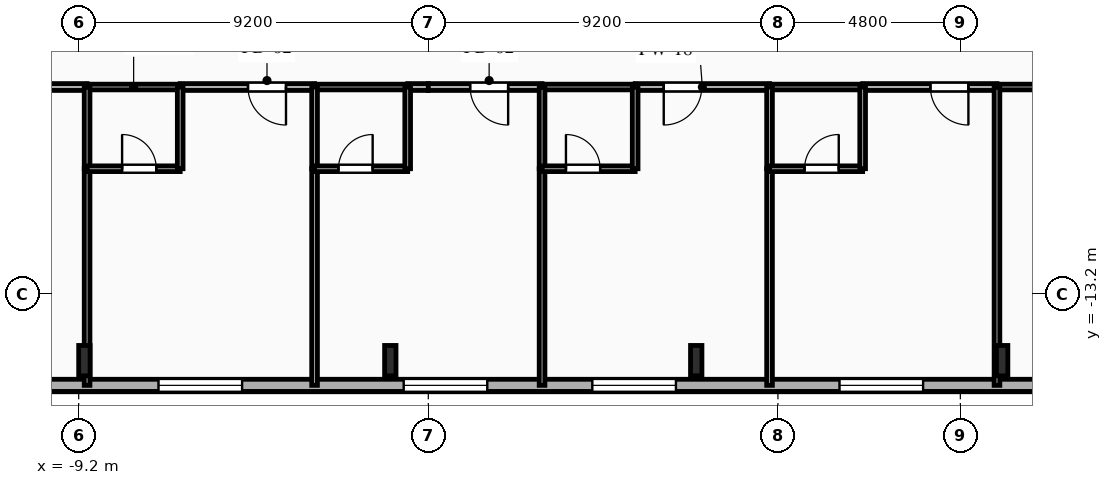
"""IFC4 building model, lengths in metres.
Left out: names, types, materials, properties, quantities, classifications, styles, units other than length and angle.
Written with IfcOpenShell. Run it as: python <this file> out.ifc"""

import sys

from ifc_helpers import new_model, si_unit, direction, frame, frame_2d, origin, origin_2d, place, context, subcontext, project, spatial, rectangle, i_section, extrude, element, fill, save


model = new_model("IFC4")
c1 = context("Model", 3, precision=1e-05, world=origin(), true_north=direction((0.0, 1.0)))
c2 = subcontext(c1, "Body", "Model", "MODEL_VIEW")
j1 = project(units=[si_unit("LENGTHUNIT", "METRE"), si_unit("PLANEANGLEUNIT", "RADIAN")], contexts=[c1])
p1 = place(None, origin())
s1 = spatial("IfcSite", under=j1, at=p1, CompositionType="ELEMENT")
p2 = place(p1, origin())
s2 = spatial("IfcBuilding", under=s1, at=p2, CompositionType="ELEMENT")
p3 = place(p2, frame((0.0, 0.0, 147.75)))
s3 = spatial("IfcBuildingStorey", under=s2, at=p3, CompositionType="ELEMENT", Elevation=147.75)
for number, where, z_axis, x_axis in (
    (1, (-9.05, -14.95, 0.0), (0.0, 0.0, 1.0), (1.0, 0.0, 0.0)),
    (2, (-1.0, -14.95, 0.0), (0.0, 0.0, 1.0), (1.0, 0.0, 0.0)),
    (3, (7.05, -14.95, 0.0), (0.0, 0.0, 1.0), (1.0, 0.0, 0.0)),
    (4, (15.1, -14.95, 0.0), (0.0, 0.0, 1.0), (1.0, 0.0, 0.0)),
):
    element("IfcColumn", number, at=place(p3, frame(where, z_axis=z_axis, x_axis=x_axis)), inside=s3, PredefinedType="COLUMN", context=c2, shape_type="SweptSolid", body=[
        extrude(i_section(OverallWidth=0.3, OverallDepth=0.8, WebThickness=0.018, FlangeThickness=0.033, FilletRadius=0.03, at=origin_2d()), origin(), (0.0, 0.0, 1.0), 3.35),
    ])
p4 = place(p3, frame((23.8, -15.6, 0.0), z_axis=(0.0, 0.0, 1.0), x_axis=(-1.0, 0.0, 0.0)))
e5 = element("IfcWall", 5, at=p4, inside=s3, PredefinedType="SOLIDWALL", context=c2, shape_type="SweptSolid", body=[
    extrude(rectangle(XDim=49.6, YDim=0.32, at=frame_2d((24.8, 0.0))), origin(), (0.0, 0.0, 1.0), 3.04),
])
p5 = place(p4, frame((1.13, 0.0, 0.85)))
e6 = element("IfcOpeningElement", 6, at=p5, cuts=e5, PredefinedType="OPENING", context=c2, shape_type="SweptSolid", body=[
    extrude(rectangle(XDim=1.1, YDim=1.85, at=frame_2d((0.55, 0.925))), frame((0.0, 0.17, 0.0), z_axis=(0.0, -1.0, 0.0), x_axis=(1.0, 0.0, 0.0)), (0.0, 0.0, 1.0), 0.34),
])
p6 = place(p4, frame((5.055, 0.0, 0.85)))
e7 = element("IfcOpeningElement", 7, at=p6, cuts=e5, PredefinedType="OPENING", context=c2, shape_type="SweptSolid", body=[
    extrude(rectangle(XDim=1.65, YDim=1.85, at=frame_2d((0.825, 0.925))), frame((0.0, 0.17, 0.0), z_axis=(0.0, -1.0, 0.0), x_axis=(1.0, 0.0, 0.0)), (0.0, 0.0, 1.0), 0.34),
])
p7 = place(p4, frame((10.78, 0.0, 0.85)))
e8 = element("IfcOpeningElement", 8, at=p7, cuts=e5, PredefinedType="OPENING", context=c2, shape_type="SweptSolid", body=[
    extrude(rectangle(XDim=2.2, YDim=1.85, at=frame_2d((1.1, 0.925))), frame((0.0, 0.17, 0.0), z_axis=(0.0, -1.0, 0.0), x_axis=(1.0, 0.0, 0.0)), (0.0, 0.0, 1.0), 0.34),
])
p8 = place(p4, frame((17.284, 0.0, 0.85)))
e9 = element("IfcOpeningElement", 9, at=p8, cuts=e5, PredefinedType="OPENING", context=c2, shape_type="SweptSolid", body=[
    extrude(rectangle(XDim=2.2, YDim=1.85, at=frame_2d((1.1, 0.925))), frame((0.0, 0.17, 0.0), z_axis=(0.0, -1.0, 0.0), x_axis=(1.0, 0.0, 0.0)), (0.0, 0.0, 1.0), 0.34),
])
p9 = place(p4, frame((22.248, 0.0, 0.85)))
e10 = element("IfcOpeningElement", 10, at=p9, cuts=e5, PredefinedType="OPENING", context=c2, shape_type="SweptSolid", body=[
    extrude(rectangle(XDim=2.2, YDim=1.85, at=frame_2d((1.1, 0.925))), frame((0.0, 0.17, 0.0), z_axis=(0.0, -1.0, 0.0), x_axis=(1.0, 0.0, 0.0)), (0.0, 0.0, 1.0), 0.34),
])
p10 = place(p4, frame((28.7, 0.0, 0.85)))
e11 = element("IfcOpeningElement", 11, at=p10, cuts=e5, PredefinedType="OPENING", context=c2, shape_type="SweptSolid", body=[
    extrude(rectangle(XDim=2.2, YDim=1.85, at=frame_2d((1.1, 0.925))), frame((0.0, 0.17, 0.0), z_axis=(0.0, -1.0, 0.0), x_axis=(1.0, 0.0, 0.0)), (0.0, 0.0, 1.0), 0.34),
])
p11 = place(p4, frame((34.7, 0.0, 0.85)))
e12 = element("IfcOpeningElement", 12, at=p11, cuts=e5, PredefinedType="OPENING", context=c2, shape_type="SweptSolid", body=[
    extrude(rectangle(XDim=2.2, YDim=1.85, at=frame_2d((1.1, 0.925))), frame((0.0, 0.17, 0.0), z_axis=(0.0, -1.0, 0.0), x_axis=(1.0, 0.0, 0.0)), (0.0, 0.0, 1.0), 0.34),
])
p12 = place(p4, frame((41.492, 0.0, 0.85)))
e13 = element("IfcOpeningElement", 13, at=p12, cuts=e5, PredefinedType="OPENING", context=c2, shape_type="SweptSolid", body=[
    extrude(rectangle(XDim=1.65, YDim=1.85, at=frame_2d((0.825, 0.925))), frame((0.0, 0.17, 0.0), z_axis=(0.0, -1.0, 0.0), x_axis=(1.0, 0.0, 0.0)), (0.0, 0.0, 1.0), 0.34),
])
p13 = place(p4, frame((46.175, 0.0, 0.85)))
e14 = element("IfcOpeningElement", 14, at=p13, cuts=e5, PredefinedType="OPENING", context=c2, shape_type="SweptSolid", body=[
    extrude(rectangle(XDim=1.65, YDim=1.85, at=frame_2d((0.825, 0.925))), frame((0.0, 0.17, 0.0), z_axis=(0.0, -1.0, 0.0), x_axis=(1.0, 0.0, 0.0)), (0.0, 0.0, 1.0), 0.34),
])
p14 = place(p3, frame((-8.979, -7.75, 0.0), z_axis=(0.0, 0.0, 1.0), x_axis=(-1.0, 0.0, 0.0)))
e15 = element("IfcWall", 15, at=p14, inside=s3, PredefinedType="PARTITIONING", context=c2, shape_type="SweptSolid", body=[
    extrude(rectangle(XDim=3.535, YDim=0.18, at=frame_2d((1.768, 0.0))), origin(), (0.0, 0.0, 1.0), 3.04),
])
p15 = place(p14, frame((1.783, 0.0, 0.0)))
e16 = element("IfcOpeningElement", 16, at=p15, cuts=e15, PredefinedType="OPENING", context=c2, shape_type="SweptSolid", body=[
    extrude(rectangle(XDim=1.0, YDim=2.15, at=frame_2d((0.5, 1.075))), frame((0.0, 0.1, 0.0), z_axis=(0.0, -1.0, 0.0), x_axis=(1.0, 0.0, 0.0)), (0.0, 0.0, 1.0), 0.2),
])
p16 = place(p3, frame((-2.993, -7.75, 0.0), z_axis=(0.0, 0.0, 1.0), x_axis=(-1.0, 0.0, 0.0)))
e17 = element("IfcWall", 17, at=p16, inside=s3, PredefinedType="PARTITIONING", context=c2, shape_type="SweptSolid", body=[
    extrude(rectangle(XDim=3.536, YDim=0.18, at=frame_2d((1.768, 0.0))), origin(), (0.0, 0.0, 1.0), 3.04),
])
p17 = place(p16, frame((0.752, 0.0, 0.0)))
e18 = element("IfcOpeningElement", 18, at=p17, cuts=e17, PredefinedType="OPENING", context=c2, shape_type="SweptSolid", body=[
    extrude(rectangle(XDim=1.0, YDim=2.15, at=frame_2d((0.5, 1.075))), frame((0.0, 0.1, 0.0), z_axis=(0.0, -1.0, 0.0), x_axis=(1.0, 0.0, 0.0)), (0.0, 0.0, 1.0), 0.2),
])
p18 = place(p3, frame((-6.529, -7.75, 0.0), z_axis=(0.0, 0.0, 1.0), x_axis=(-1.0, 0.0, 0.0)))
e19 = element("IfcWall", 19, at=p18, inside=s3, PredefinedType="PLUMBINGWALL", context=c2, shape_type="SweptSolid", body=[
    extrude(rectangle(XDim=2.45, YDim=0.15, at=frame_2d((1.225, 0.0))), origin(), (0.0, 0.0, 1.0), 3.04),
])
p19 = place(p3, frame((0.0, -7.75, 0.0), z_axis=(0.0, 0.0, 1.0), x_axis=(-1.0, 0.0, 0.0)))
e20 = element("IfcWall", 20, at=p19, inside=s3, PredefinedType="PARTITIONING", context=c2, shape_type="SweptSolid", body=[
    extrude(rectangle(XDim=0.543, YDim=0.18, at=frame_2d((0.271, 0.0))), origin(), (0.0, 0.0, 1.0), 3.04),
])
p20 = place(p3, frame((-0.543, -7.75, 0.0), z_axis=(0.0, 0.0, 1.0), x_axis=(-1.0, 0.0, 0.0)))
e21 = element("IfcWall", 21, at=p20, inside=s3, PredefinedType="PLUMBINGWALL", context=c2, shape_type="SweptSolid", body=[
    extrude(rectangle(XDim=2.45, YDim=0.15, at=frame_2d((1.225, 0.0))), origin(), (0.0, 0.0, 1.0), 3.04),
])
p21 = place(p3, frame((2.993, -7.75, 0.0), z_axis=(0.0, 0.0, 1.0), x_axis=(-1.0, 0.0, 0.0)))
e22 = element("IfcWall", 22, at=p21, inside=s3, PredefinedType="PARTITIONING", context=c2, shape_type="SweptSolid", body=[
    extrude(rectangle(XDim=2.993, YDim=0.18, at=frame_2d((1.497, 0.0))), origin(), (0.0, 0.0, 1.0), 3.04),
])
p22 = place(p21, frame((0.892, 0.0, 0.0)))
e23 = element("IfcOpeningElement", 23, at=p22, cuts=e22, PredefinedType="OPENING", context=c2, shape_type="SweptSolid", body=[
    extrude(rectangle(XDim=1.0, YDim=2.15, at=frame_2d((0.5, 1.075))), frame((0.0, 0.1, 0.0), z_axis=(0.0, -1.0, 0.0), x_axis=(1.0, 0.0, 0.0)), (0.0, 0.0, 1.0), 0.2),
])
p23 = place(p3, frame((8.979, -7.75, 0.0), z_axis=(0.0, 0.0, 1.0), x_axis=(-1.0, 0.0, 0.0)))
e24 = element("IfcWall", 24, at=p23, inside=s3, PredefinedType="PARTITIONING", context=c2, shape_type="SweptSolid", body=[
    extrude(rectangle(XDim=3.536, YDim=0.18, at=frame_2d((1.768, 0.0))), origin(), (0.0, 0.0, 1.0), 3.04),
])
p24 = place(p23, frame((1.784, 0.0, 0.0)))
e25 = element("IfcOpeningElement", 25, at=p24, cuts=e24, PredefinedType="OPENING", context=c2, shape_type="SweptSolid", body=[
    extrude(rectangle(XDim=1.0, YDim=2.15, at=frame_2d((0.5, 1.075))), frame((0.0, 0.1, 0.0), z_axis=(0.0, -1.0, 0.0), x_axis=(1.0, 0.0, 0.0)), (0.0, 0.0, 1.0), 0.2),
])
p25 = place(p3, frame((5.443, -7.75, 0.0), z_axis=(0.0, 0.0, 1.0), x_axis=(-1.0, 0.0, 0.0)))
e26 = element("IfcWall", 26, at=p25, inside=s3, PredefinedType="PLUMBINGWALL", context=c2, shape_type="SweptSolid", body=[
    extrude(rectangle(XDim=2.45, YDim=0.15, at=frame_2d((1.225, 0.0))), origin(), (0.0, 0.0, 1.0), 3.04),
])
p26 = place(p3, frame((14.964, -7.75, 0.0), z_axis=(0.0, 0.0, 1.0), x_axis=(-1.0, 0.0, 0.0)))
e27 = element("IfcWall", 27, at=p26, inside=s3, PredefinedType="PARTITIONING", context=c2, shape_type="SweptSolid", body=[
    extrude(rectangle(XDim=3.535, YDim=0.18, at=frame_2d((1.768, 0.0))), origin(), (0.0, 0.0, 1.0), 3.04),
])
p27 = place(p26, frame((0.752, 0.0, 0.0)))
e28 = element("IfcOpeningElement", 28, at=p27, cuts=e27, PredefinedType="OPENING", context=c2, shape_type="SweptSolid", body=[
    extrude(rectangle(XDim=1.0, YDim=2.15, at=frame_2d((0.5, 1.075))), frame((0.0, 0.1, 0.0), z_axis=(0.0, -1.0, 0.0), x_axis=(1.0, 0.0, 0.0)), (0.0, 0.0, 1.0), 0.2),
])
p28 = place(p3, frame((11.429, -7.75, 0.0), z_axis=(0.0, 0.0, 1.0), x_axis=(-1.0, 0.0, 0.0)))
e29 = element("IfcWall", 29, at=p28, inside=s3, PredefinedType="PLUMBINGWALL", context=c2, shape_type="SweptSolid", body=[
    extrude(rectangle(XDim=2.45, YDim=0.15, at=frame_2d((1.225, 0.0))), origin(), (0.0, 0.0, 1.0), 3.04),
])
p29 = place(p3, frame((20.95, -7.75, 0.0), z_axis=(0.0, 0.0, 1.0), x_axis=(-1.0, 0.0, 0.0)))
e30 = element("IfcWall", 30, at=p29, inside=s3, PredefinedType="PARTITIONING", context=c2, shape_type="SweptSolid", body=[
    extrude(rectangle(XDim=5.986, YDim=0.15, at=frame_2d((2.993, 0.0))), origin(), (0.0, 0.0, 1.0), 3.04),
])
p30 = place(p29, frame((3.884, 0.0, 0.0)))
e31 = element("IfcOpeningElement", 31, at=p30, cuts=e30, PredefinedType="OPENING", context=c2, shape_type="SweptSolid", body=[
    extrude(rectangle(XDim=1.05, YDim=2.15, at=frame_2d((0.525, 1.075))), frame((0.0, 0.085, 0.0), z_axis=(0.0, -1.0, 0.0), x_axis=(1.0, 0.0, 0.0)), (0.0, 0.0, 1.0), 0.17),
])
p31 = place(p3, frame((-8.979, -9.9, 0.0), z_axis=(0.0, 0.0, 1.0), x_axis=(0.0, -1.0, 0.0)))
e32 = element("IfcWall", 32, at=p31, inside=s3, PredefinedType="PARTITIONING", context=c2, shape_type="SweptSolid", body=[
    extrude(rectangle(XDim=5.7, YDim=0.15, at=frame_2d((2.85, 0.0))), origin(), (0.0, 0.0, 1.0), 2.525),
])
p32 = place(p3, frame((-8.979, -7.75, 0.0), z_axis=(0.0, 0.0, 1.0), x_axis=(0.0, -1.0, 0.0)))
e33 = element("IfcWall", 33, at=p32, inside=s3, PredefinedType="PLUMBINGWALL", context=c2, shape_type="SweptSolid", body=[
    extrude(rectangle(XDim=2.15, YDim=0.15, at=frame_2d((1.075, 0.0))), origin(), (0.0, 0.0, 1.0), 2.525),
])
p33 = place(p3, frame((-8.979, -9.9, 0.0), z_axis=(0.0, 0.0, 1.0), x_axis=(1.0, 0.0, 0.0)))
e34 = element("IfcWall", 34, at=p33, inside=s3, PredefinedType="PLUMBINGWALL", context=c2, shape_type="SweptSolid", body=[
    extrude(rectangle(XDim=2.45, YDim=0.15, at=frame_2d((1.225, 0.0))), origin(), (0.0, 0.0, 1.0), 3.04),
])
p34 = place(p33, frame((0.921, 0.0, 0.0)))
e35 = element("IfcOpeningElement", 35, at=p34, cuts=e34, PredefinedType="OPENING", context=c2, shape_type="SweptSolid", body=[
    extrude(rectangle(XDim=0.9, YDim=2.1, at=frame_2d((0.45, 1.05))), frame((0.0, 0.085, 0.0), z_axis=(0.0, -1.0, 0.0), x_axis=(1.0, 0.0, 0.0)), (0.0, 0.0, 1.0), 0.17),
])
p35 = place(p3, frame((-6.529, -9.9, 0.0), z_axis=(0.0, 0.0, 1.0), x_axis=(0.0, 1.0, 0.0)))
e36 = element("IfcWall", 36, at=p35, inside=s3, PredefinedType="PLUMBINGWALL", context=c2, shape_type="SweptSolid", body=[
    extrude(rectangle(XDim=2.15, YDim=0.15, at=frame_2d((1.075, 0.0))), origin(), (0.0, 0.0, 1.0), 3.04),
])
p36 = place(p3, frame((-2.993, -9.9, 0.0), z_axis=(0.0, 0.0, 1.0), x_axis=(0.0, -1.0, 0.0)))
e37 = element("IfcWall", 37, at=p36, inside=s3, PredefinedType="PARTITIONING", context=c2, shape_type="SweptSolid", body=[
    extrude(rectangle(XDim=5.7, YDim=0.15, at=frame_2d((2.85, 0.0))), origin(), (0.0, 0.0, 1.0), 3.04),
])
p37 = place(p3, frame((-2.993, -7.75, 0.0), z_axis=(0.0, 0.0, 1.0), x_axis=(0.0, -1.0, 0.0)))
e38 = element("IfcWall", 38, at=p37, inside=s3, PredefinedType="PLUMBINGWALL", context=c2, shape_type="SweptSolid", body=[
    extrude(rectangle(XDim=2.15, YDim=0.15, at=frame_2d((1.075, 0.0))), origin(), (0.0, 0.0, 1.0), 3.04),
])
p38 = place(p3, frame((-2.993, -9.9, 0.0), z_axis=(0.0, 0.0, 1.0), x_axis=(1.0, 0.0, 0.0)))
e39 = element("IfcWall", 39, at=p38, inside=s3, PredefinedType="PLUMBINGWALL", context=c2, shape_type="SweptSolid", body=[
    extrude(rectangle(XDim=2.45, YDim=0.15, at=frame_2d((1.225, 0.0))), origin(), (0.0, 0.0, 1.0), 3.04),
])
p39 = place(p38, frame((0.629, 0.0, 0.0)))
e40 = element("IfcOpeningElement", 40, at=p39, cuts=e39, PredefinedType="OPENING", context=c2, shape_type="SweptSolid", body=[
    extrude(rectangle(XDim=0.9, YDim=2.1, at=frame_2d((0.45, 1.05))), frame((0.0, 0.085, 0.0), z_axis=(0.0, -1.0, 0.0), x_axis=(1.0, 0.0, 0.0)), (0.0, 0.0, 1.0), 0.17),
])
p40 = place(p3, frame((-0.543, -9.9, 0.0), z_axis=(0.0, 0.0, 1.0), x_axis=(0.0, 1.0, 0.0)))
e41 = element("IfcWall", 41, at=p40, inside=s3, PredefinedType="PLUMBINGWALL", context=c2, shape_type="SweptSolid", body=[
    extrude(rectangle(XDim=2.15, YDim=0.15, at=frame_2d((1.075, 0.0))), origin(), (0.0, 0.0, 1.0), 3.04),
])
p41 = place(p3, frame((2.993, -9.9, 0.0), z_axis=(0.0, 0.0, 1.0), x_axis=(0.0, -1.0, 0.0)))
e42 = element("IfcWall", 42, at=p41, inside=s3, PredefinedType="PARTITIONING", context=c2, shape_type="SweptSolid", body=[
    extrude(rectangle(XDim=5.7, YDim=0.15, at=frame_2d((2.85, 0.0))), origin(), (0.0, 0.0, 1.0), 3.04),
])
p42 = place(p3, frame((2.993, -7.75, 0.0), z_axis=(0.0, 0.0, 1.0), x_axis=(0.0, -1.0, 0.0)))
e43 = element("IfcWall", 43, at=p42, inside=s3, PredefinedType="PLUMBINGWALL", context=c2, shape_type="SweptSolid", body=[
    extrude(rectangle(XDim=2.15, YDim=0.15, at=frame_2d((1.075, 0.0))), origin(), (0.0, 0.0, 1.0), 3.04),
])
p43 = place(p3, frame((2.993, -9.9, 0.0), z_axis=(0.0, 0.0, 1.0), x_axis=(1.0, 0.0, 0.0)))
e44 = element("IfcWall", 44, at=p43, inside=s3, PredefinedType="PLUMBINGWALL", context=c2, shape_type="SweptSolid", body=[
    extrude(rectangle(XDim=2.45, YDim=0.15, at=frame_2d((1.225, 0.0))), origin(), (0.0, 0.0, 1.0), 3.04),
])
p44 = place(p43, frame((0.629, 0.0, 0.0)))
e45 = element("IfcOpeningElement", 45, at=p44, cuts=e44, PredefinedType="OPENING", context=c2, shape_type="SweptSolid", body=[
    extrude(rectangle(XDim=0.9, YDim=2.1, at=frame_2d((0.45, 1.05))), frame((0.0, 0.085, 0.0), z_axis=(0.0, -1.0, 0.0), x_axis=(1.0, 0.0, 0.0)), (0.0, 0.0, 1.0), 0.17),
])
p45 = place(p3, frame((5.443, -9.9, 0.0), z_axis=(0.0, 0.0, 1.0), x_axis=(0.0, 1.0, 0.0)))
e46 = element("IfcWall", 46, at=p45, inside=s3, PredefinedType="PLUMBINGWALL", context=c2, shape_type="SweptSolid", body=[
    extrude(rectangle(XDim=2.15, YDim=0.15, at=frame_2d((1.075, 0.0))), origin(), (0.0, 0.0, 1.0), 3.04),
])
p46 = place(p3, frame((8.979, -9.9, 0.0), z_axis=(0.0, 0.0, 1.0), x_axis=(0.0, -1.0, 0.0)))
e47 = element("IfcWall", 47, at=p46, inside=s3, PredefinedType="PARTITIONING", context=c2, shape_type="SweptSolid", body=[
    extrude(rectangle(XDim=5.7, YDim=0.15, at=frame_2d((2.85, 0.0))), origin(), (0.0, 0.0, 1.0), 3.04),
])
p47 = place(p3, frame((8.979, -7.75, 0.0), z_axis=(0.0, 0.0, 1.0), x_axis=(0.0, -1.0, 0.0)))
e48 = element("IfcWall", 48, at=p47, inside=s3, PredefinedType="PLUMBINGWALL", context=c2, shape_type="SweptSolid", body=[
    extrude(rectangle(XDim=2.15, YDim=0.15, at=frame_2d((1.075, 0.0))), origin(), (0.0, 0.0, 1.0), 3.04),
])
p48 = place(p3, frame((8.979, -9.9, 0.0), z_axis=(0.0, 0.0, 1.0), x_axis=(1.0, 0.0, 0.0)))
e49 = element("IfcWall", 49, at=p48, inside=s3, PredefinedType="PLUMBINGWALL", context=c2, shape_type="SweptSolid", body=[
    extrude(rectangle(XDim=2.45, YDim=0.15, at=frame_2d((1.225, 0.0))), origin(), (0.0, 0.0, 1.0), 3.04),
])
p49 = place(p48, frame((0.921, 0.0, 0.0)))
e50 = element("IfcOpeningElement", 50, at=p49, cuts=e49, PredefinedType="OPENING", context=c2, shape_type="SweptSolid", body=[
    extrude(rectangle(XDim=0.9, YDim=2.1, at=frame_2d((0.45, 1.05))), frame((0.0, 0.085, 0.0), z_axis=(0.0, -1.0, 0.0), x_axis=(1.0, 0.0, 0.0)), (0.0, 0.0, 1.0), 0.17),
])
p50 = place(p3, frame((11.429, -9.9, 0.0), z_axis=(0.0, 0.0, 1.0), x_axis=(0.0, 1.0, 0.0)))
e51 = element("IfcWall", 51, at=p50, inside=s3, PredefinedType="PLUMBINGWALL", context=c2, shape_type="SweptSolid", body=[
    extrude(rectangle(XDim=2.15, YDim=0.15, at=frame_2d((1.075, 0.0))), origin(), (0.0, 0.0, 1.0), 3.04),
])
p51 = place(p3, frame((14.964, -7.75, 0.0), z_axis=(0.0, 0.0, 1.0), x_axis=(0.0, -1.0, 0.0)))
e52 = element("IfcWall", 52, at=p51, inside=s3, PredefinedType="PARTITIONING", context=c2, shape_type="SweptSolid", body=[
    extrude(rectangle(XDim=7.85, YDim=0.15, at=frame_2d((3.925, 0.0))), origin(), (0.0, 0.0, 1.0), 3.04),
])
p52 = place(p7, origin())
e53 = element("IfcWindow", 53, at=p52, inside=s3, PartitioningType="SINGLE_PANEL", PredefinedType="WINDOW", context=c2, shape_type="SweptSolid", body=[
    extrude(rectangle(XDim=2.2, YDim=1.85, at=frame_2d((1.1, 0.925))), frame((0.0, 0.03, 0.0), z_axis=(0.0, -1.0, 0.0), x_axis=(1.0, 0.0, 0.0)), (0.0, 0.0, 1.0), 0.06),
])
fill(e8, e53)
p53 = place(p8, origin())
e54 = element("IfcWindow", 54, at=p53, inside=s3, PartitioningType="SINGLE_PANEL", PredefinedType="WINDOW", context=c2, shape_type="SweptSolid", body=[
    extrude(rectangle(XDim=2.2, YDim=1.85, at=frame_2d((1.1, 0.925))), frame((0.0, 0.03, 0.0), z_axis=(0.0, -1.0, 0.0), x_axis=(1.0, 0.0, 0.0)), (0.0, 0.0, 1.0), 0.06),
])
fill(e9, e54)
p54 = place(p9, origin())
e55 = element("IfcWindow", 55, at=p54, inside=s3, PartitioningType="SINGLE_PANEL", PredefinedType="WINDOW", context=c2, shape_type="SweptSolid", body=[
    extrude(rectangle(XDim=2.2, YDim=1.85, at=frame_2d((1.1, 0.925))), frame((0.0, 0.03, 0.0), z_axis=(0.0, -1.0, 0.0), x_axis=(1.0, 0.0, 0.0)), (0.0, 0.0, 1.0), 0.06),
])
fill(e10, e55)
p55 = place(p10, origin())
e56 = element("IfcWindow", 56, at=p55, inside=s3, PartitioningType="SINGLE_PANEL", PredefinedType="WINDOW", context=c2, shape_type="SweptSolid", body=[
    extrude(rectangle(XDim=2.2, YDim=1.85, at=frame_2d((1.1, 0.925))), frame((0.0, 0.03, 0.0), z_axis=(0.0, -1.0, 0.0), x_axis=(1.0, 0.0, 0.0)), (0.0, 0.0, 1.0), 0.06),
])
fill(e11, e56)
p56 = place(p17, origin())
e57 = element("IfcDoor", 57, at=p56, inside=s3, OperationType="SINGLE_SWING_LEFT", PredefinedType="DOOR", context=c2, shape_type="SweptSolid", body=[
    extrude(rectangle(XDim=1.0, YDim=2.15, at=frame_2d((0.5, 1.075))), frame((0.0, 0.025, 0.0), z_axis=(0.0, -1.0, 0.0), x_axis=(1.0, 0.0, 0.0)), (0.0, 0.0, 1.0), 0.05),
])
fill(e18, e57)
p57 = place(p22, origin())
e58 = element("IfcDoor", 58, at=p57, inside=s3, OperationType="SINGLE_SWING_LEFT", PredefinedType="DOOR", context=c2, shape_type="SweptSolid", body=[
    extrude(rectangle(XDim=1.0, YDim=2.15, at=frame_2d((0.5, 1.075))), frame((0.0, 0.025, 0.0), z_axis=(0.0, -1.0, 0.0), x_axis=(1.0, 0.0, 0.0)), (0.0, 0.0, 1.0), 0.05),
])
fill(e23, e58)
p58 = place(p24, origin())
e59 = element("IfcDoor", 59, at=p58, inside=s3, OperationType="SINGLE_SWING_RIGHT", PredefinedType="DOOR", context=c2, shape_type="SweptSolid", body=[
    extrude(rectangle(XDim=1.0, YDim=2.15, at=frame_2d((0.5, 1.075))), frame((0.0, 0.025, 0.0), z_axis=(0.0, -1.0, 0.0), x_axis=(1.0, 0.0, 0.0)), (0.0, 0.0, 1.0), 0.05),
])
fill(e25, e59)
p59 = place(p27, origin())
e60 = element("IfcDoor", 60, at=p59, inside=s3, OperationType="SINGLE_SWING_LEFT", PredefinedType="DOOR", context=c2, shape_type="SweptSolid", body=[
    extrude(rectangle(XDim=1.0, YDim=2.15, at=frame_2d((0.5, 1.075))), frame((0.0, 0.025, 0.0), z_axis=(0.0, -1.0, 0.0), x_axis=(1.0, 0.0, 0.0)), (0.0, 0.0, 1.0), 0.05),
])
fill(e28, e60)
p60 = place(p34, origin())
e61 = element("IfcDoor", 61, at=p60, inside=s3, OperationType="SINGLE_SWING_LEFT", PredefinedType="DOOR", context=c2, shape_type="SweptSolid", body=[
    extrude(rectangle(XDim=0.9, YDim=2.1, at=frame_2d((0.45, 1.05))), frame((0.0, 0.025, 0.0), z_axis=(0.0, -1.0, 0.0), x_axis=(1.0, 0.0, 0.0)), (0.0, 0.0, 1.0), 0.05),
])
fill(e35, e61)
p61 = place(p39, origin())
e62 = element("IfcDoor", 62, at=p61, inside=s3, OperationType="SINGLE_SWING_RIGHT", PredefinedType="DOOR", context=c2, shape_type="SweptSolid", body=[
    extrude(rectangle(XDim=0.9, YDim=2.1, at=frame_2d((0.45, 1.05))), frame((0.0, 0.025, 0.0), z_axis=(0.0, -1.0, 0.0), x_axis=(1.0, 0.0, 0.0)), (0.0, 0.0, 1.0), 0.05),
])
fill(e40, e62)
p62 = place(p44, origin())
e63 = element("IfcDoor", 63, at=p62, inside=s3, OperationType="SINGLE_SWING_LEFT", PredefinedType="DOOR", context=c2, shape_type="SweptSolid", body=[
    extrude(rectangle(XDim=0.9, YDim=2.1, at=frame_2d((0.45, 1.05))), frame((0.0, 0.025, 0.0), z_axis=(0.0, -1.0, 0.0), x_axis=(1.0, 0.0, 0.0)), (0.0, 0.0, 1.0), 0.05),
])
fill(e45, e63)
p63 = place(p49, origin())
e64 = element("IfcDoor", 64, at=p63, inside=s3, OperationType="SINGLE_SWING_RIGHT", PredefinedType="DOOR", context=c2, shape_type="SweptSolid", body=[
    extrude(rectangle(XDim=0.9, YDim=2.1, at=frame_2d((0.45, 1.05))), frame((0.0, 0.025, 0.0), z_axis=(0.0, -1.0, 0.0), x_axis=(1.0, 0.0, 0.0)), (0.0, 0.0, 1.0), 0.05),
])
fill(e50, e64)
save(model, sys.argv[1])
